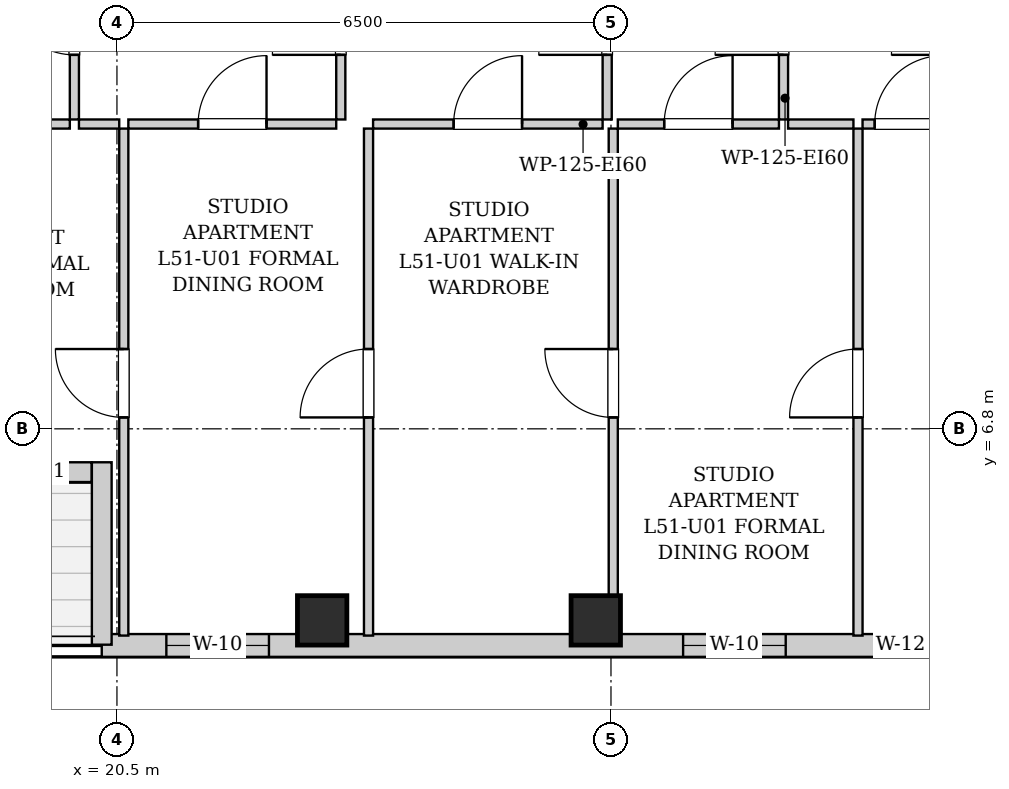
"""IFC4 building model, lengths in metres.
Left out: names, types, materials, properties, quantities, classifications, styles, units other than length and angle.
Written with IfcOpenShell. Run it as: python <this file> out.ifc"""

import sys

from ifc_helpers import new_model, si_unit, direction, frame, frame_2d, origin, origin_2d, place, context, subcontext, project, spatial, rectangle, extrude, element, fill, save


model = new_model("IFC4")
c1 = context("Model", 3, precision=1e-05, world=origin(), true_north=direction((0.0, 1.0)))
c2 = subcontext(c1, "Body", "Model", "MODEL_VIEW")
j1 = project(units=[si_unit("LENGTHUNIT", "METRE"), si_unit("PLANEANGLEUNIT", "RADIAN")], contexts=[c1])
p1 = place(None, origin())
s1 = spatial("IfcSite", under=j1, at=p1, CompositionType="ELEMENT")
p2 = place(p1, origin())
s2 = spatial("IfcBuilding", under=s1, at=p2, CompositionType="ELEMENT")
p3 = place(p2, frame((0.0, 0.0, 177.7)))
s3 = spatial("IfcBuildingStorey", under=s2, at=p3, CompositionType="ELEMENT", Elevation=177.7)
for number, where, z_axis, x_axis in (
    (1, (23.2, 4.28, 0.0), (0.0, 0.0, 1.0), (1.0, 0.0, 0.0)),
    (2, (26.8, 4.28, 0.0), (0.0, 0.0, 1.0), (1.0, 0.0, 0.0)),
):
    element("IfcColumn", number, at=place(p3, frame(where, z_axis=z_axis, x_axis=x_axis)), inside=s3, PredefinedType="COLUMN", context=c2, shape_type="SweptSolid", body=[
        extrude(rectangle(XDim=0.65, YDim=0.65, at=origin_2d()), origin(), (0.0, 0.0, 1.0), 3.3),
    ])
p4 = place(p3, frame((31.5, 3.95, 0.0), z_axis=(0.0, 0.0, 1.0), x_axis=(-1.0, 0.0, 0.0)))
e3 = element("IfcWall", 3, at=p4, inside=s3, PredefinedType="SOLIDWALL", context=c2, shape_type="SweptSolid", body=[
    extrude(rectangle(XDim=11.2, YDim=0.3, at=frame_2d((5.6, 0.0))), origin(), (0.0, 0.0, 1.0), 3.04),
])
p5 = place(p4, frame((9.0, 0.0, 0.55)))
e4 = element("IfcOpeningElement", 4, at=p5, cuts=e3, PredefinedType="OPENING", context=c2, shape_type="SweptSolid", body=[
    extrude(rectangle(XDim=1.35, YDim=1.2, at=frame_2d((0.675, 0.6))), frame((0.0, 0.16, 0.0), z_axis=(0.0, -1.0, 0.0), x_axis=(1.0, 0.0, 0.0)), (0.0, 0.0, 1.0), 0.32),
])
p6 = place(p4, frame((2.201, 0.0, 0.55)))
e5 = element("IfcOpeningElement", 5, at=p6, cuts=e3, PredefinedType="OPENING", context=c2, shape_type="SweptSolid", body=[
    extrude(rectangle(XDim=1.35, YDim=1.2, at=frame_2d((0.675, 0.6))), frame((0.0, 0.16, 0.0), z_axis=(0.0, -1.0, 0.0), x_axis=(1.0, 0.0, 0.0)), (0.0, 0.0, 1.0), 0.32),
])
p7 = place(p4, frame((0.35, 0.0, 0.55)))
e6 = element("IfcOpeningElement", 6, at=p7, cuts=e3, PredefinedType="OPENING", context=c2, shape_type="SweptSolid", body=[
    extrude(rectangle(XDim=0.68, YDim=1.2, at=frame_2d((0.34, 0.6))), frame((0.0, 0.16, 0.0), z_axis=(0.0, -1.0, 0.0), x_axis=(1.0, 0.0, 0.0)), (0.0, 0.0, 1.0), 0.32),
])
p8 = place(p3, frame((20.3, 3.96, 0.0), z_axis=(0.0, 0.0, 1.0), x_axis=(0.0, 1.0, 0.0)))
e7 = element("IfcWall", 7, at=p8, inside=s3, PredefinedType="SOLIDWALL", context=c2, shape_type="SweptSolid", body=[
    extrude(rectangle(XDim=2.4, YDim=0.26, at=frame_2d((1.2, 0.0))), origin(), (0.0, 0.0, 1.0), 3.04),
])
p9 = place(p3, frame((20.166, 6.23, 0.0), z_axis=(0.0, 0.0, 1.0), x_axis=(-1.0, 0.0, 0.0)))
e8 = element("IfcWall", 8, at=p9, inside=s3, PredefinedType="SOLIDWALL", context=c2, shape_type="SweptSolid", body=[
    extrude(rectangle(XDim=4.332, YDim=0.26, at=frame_2d((2.166, 0.0))), origin(), (0.0, 0.0, 1.0), 3.04),
])
p10 = place(p9, frame((1.556, 0.0, 0.0)))
e9 = element("IfcOpeningElement", 9, at=p10, cuts=e8, PredefinedType="OPENING", context=c2, shape_type="SweptSolid", body=[
    extrude(rectangle(XDim=1.1, YDim=2.0, at=frame_2d((0.55, 1.0))), frame((0.0, 0.14, 0.0), z_axis=(0.0, -1.0, 0.0), x_axis=(1.0, 0.0, 0.0)), (0.0, 0.0, 1.0), 0.28),
])
p11 = place(p9, frame((0.546, 0.0, 0.55)))
e10 = element("IfcOpeningElement", 10, at=p11, cuts=e8, PredefinedType="OPENING", context=c2, shape_type="SweptSolid", body=[
    extrude(rectangle(XDim=0.85, YDim=1.2, at=frame_2d((0.425, 0.6))), frame((0.0, 0.14, 0.0), z_axis=(0.0, -1.0, 0.0), x_axis=(1.0, 0.0, 0.0)), (0.0, 0.0, 1.0), 0.28),
])
p12 = place(p3, frame((19.94, 10.87, 0.0), z_axis=(0.0, 0.0, 1.0), x_axis=(0.0, 1.0, 0.0)))
e11 = element("IfcWall", 11, at=p12, inside=s3, PredefinedType="PARTITIONING", context=c2, shape_type="SweptSolid", body=[
    extrude(rectangle(XDim=2.6, YDim=0.12, at=frame_2d((1.3, 0.0))), origin(), (0.0, 0.0, 1.0), 3.04),
])
p13 = place(p12, frame((0.85, 0.0, 0.0)))
e12 = element("IfcOpeningElement", 12, at=p13, cuts=e11, PredefinedType="OPENING", context=c2, shape_type="SweptSolid", body=[
    extrude(rectangle(XDim=0.9, YDim=2.05, at=frame_2d((0.45, 1.025))), frame((0.0, 0.07, 0.0), z_axis=(0.0, -1.0, 0.0), x_axis=(1.0, 0.0, 0.0)), (0.0, 0.0, 1.0), 0.14),
])
p14 = place(p3, frame((17.43, 10.81, 0.0), z_axis=(0.0, 0.0, 1.0), x_axis=(1.0, 0.0, 0.0)))
e13 = element("IfcWall", 13, at=p14, inside=s3, PredefinedType="PARTITIONING", context=c2, shape_type="SweptSolid", body=[
    extrude(rectangle(XDim=2.45, YDim=0.12, at=frame_2d((1.225, 0.0))), origin(), (0.0, 0.0, 1.0), 3.04),
])
p15 = place(p14, frame((0.775, 0.0, 0.0)))
e14 = element("IfcOpeningElement", 14, at=p15, cuts=e13, PredefinedType="OPENING", context=c2, shape_type="SweptSolid", body=[
    extrude(rectangle(XDim=0.9, YDim=2.05, at=frame_2d((0.45, 1.025))), frame((0.0, 0.07, 0.0), z_axis=(0.0, -1.0, 0.0), x_axis=(1.0, 0.0, 0.0)), (0.0, 0.0, 1.0), 0.14),
])
p16 = place(p3, frame((23.445, 10.87, 0.0), z_axis=(0.0, 0.0, 1.0), x_axis=(0.0, 1.0, 0.0)))
e15 = element("IfcWall", 15, at=p16, inside=s3, PredefinedType="PARTITIONING", context=c2, shape_type="SweptSolid", body=[
    extrude(rectangle(XDim=2.6, YDim=0.12, at=frame_2d((1.3, 0.0))), origin(), (0.0, 0.0, 1.0), 3.04),
])
p17 = place(p16, frame((0.85, 0.0, 0.0)))
e16 = element("IfcOpeningElement", 16, at=p17, cuts=e15, PredefinedType="OPENING", context=c2, shape_type="SweptSolid", body=[
    extrude(rectangle(XDim=0.9, YDim=2.05, at=frame_2d((0.45, 1.025))), frame((0.0, 0.07, 0.0), z_axis=(0.0, -1.0, 0.0), x_axis=(1.0, 0.0, 0.0)), (0.0, 0.0, 1.0), 0.14),
])
p18 = place(p3, frame((20.0, 10.81, 0.0), z_axis=(0.0, 0.0, 1.0), x_axis=(1.0, 0.0, 0.0)))
e17 = element("IfcWall", 17, at=p18, inside=s3, PredefinedType="PARTITIONING", context=c2, shape_type="SweptSolid", body=[
    extrude(rectangle(XDim=0.53, YDim=0.12, at=frame_2d((0.265, 0.0))), origin(), (0.0, 0.0, 1.0), 3.04),
])
p19 = place(p3, frame((20.65, 10.81, 0.0), z_axis=(0.0, 0.0, 1.0), x_axis=(1.0, 0.0, 0.0)))
e18 = element("IfcWall", 18, at=p19, inside=s3, PredefinedType="PARTITIONING", context=c2, shape_type="SweptSolid", body=[
    extrude(rectangle(XDim=2.735, YDim=0.12, at=frame_2d((1.368, 0.0))), origin(), (0.0, 0.0, 1.0), 3.04),
])
p20 = place(p19, frame((0.918, 0.0, 0.0)))
e19 = element("IfcOpeningElement", 19, at=p20, cuts=e18, PredefinedType="OPENING", context=c2, shape_type="SweptSolid", body=[
    extrude(rectangle(XDim=0.9, YDim=2.05, at=frame_2d((0.45, 1.025))), frame((0.0, 0.07, 0.0), z_axis=(0.0, -1.0, 0.0), x_axis=(1.0, 0.0, 0.0)), (0.0, 0.0, 1.0), 0.14),
])
p21 = place(p3, frame((26.95, 10.87, 0.0), z_axis=(0.0, 0.0, 1.0), x_axis=(0.0, 1.0, 0.0)))
e20 = element("IfcWall", 20, at=p21, inside=s3, PredefinedType="PARTITIONING", context=c2, shape_type="SweptSolid", body=[
    extrude(rectangle(XDim=2.6, YDim=0.12, at=frame_2d((1.3, 0.0))), origin(), (0.0, 0.0, 1.0), 3.04),
])
p22 = place(p21, frame((0.85, 0.0, 0.0)))
e21 = element("IfcOpeningElement", 21, at=p22, cuts=e20, PredefinedType="OPENING", context=c2, shape_type="SweptSolid", body=[
    extrude(rectangle(XDim=0.9, YDim=2.05, at=frame_2d((0.45, 1.025))), frame((0.0, 0.07, 0.0), z_axis=(0.0, -1.0, 0.0), x_axis=(1.0, 0.0, 0.0)), (0.0, 0.0, 1.0), 0.14),
])
p23 = place(p3, frame((23.87, 10.81, 0.0), z_axis=(0.0, 0.0, 1.0), x_axis=(1.0, 0.0, 0.0)))
e22 = element("IfcWall", 22, at=p23, inside=s3, PredefinedType="PARTITIONING", context=c2, shape_type="SweptSolid", body=[
    extrude(rectangle(XDim=3.02, YDim=0.12, at=frame_2d((1.51, 0.0))), origin(), (0.0, 0.0, 1.0), 3.04),
])
p24 = place(p23, frame((1.06, 0.0, 0.0)))
e23 = element("IfcOpeningElement", 23, at=p24, cuts=e22, PredefinedType="OPENING", context=c2, shape_type="SweptSolid", body=[
    extrude(rectangle(XDim=0.9, YDim=2.05, at=frame_2d((0.45, 1.025))), frame((0.0, 0.07, 0.0), z_axis=(0.0, -1.0, 0.0), x_axis=(1.0, 0.0, 0.0)), (0.0, 0.0, 1.0), 0.14),
])
p25 = place(p3, frame((29.27, 10.87, 0.0), z_axis=(0.0, 0.0, 1.0), x_axis=(0.0, 1.0, 0.0)))
e24 = element("IfcWall", 24, at=p25, inside=s3, PredefinedType="PARTITIONING", context=c2, shape_type="SweptSolid", body=[
    extrude(rectangle(XDim=2.6, YDim=0.12, at=frame_2d((1.3, 0.0))), origin(), (0.0, 0.0, 1.0), 3.04),
])
p26 = place(p25, frame((0.85, 0.0, 0.0)))
e25 = element("IfcOpeningElement", 25, at=p26, cuts=e24, PredefinedType="OPENING", context=c2, shape_type="SweptSolid", body=[
    extrude(rectangle(XDim=0.9, YDim=2.05, at=frame_2d((0.45, 1.025))), frame((0.0, 0.07, 0.0), z_axis=(0.0, -1.0, 0.0), x_axis=(1.0, 0.0, 0.0)), (0.0, 0.0, 1.0), 0.14),
])
p27 = place(p3, frame((27.09, 10.81, 0.0), z_axis=(0.0, 0.0, 1.0), x_axis=(1.0, 0.0, 0.0)))
e26 = element("IfcWall", 26, at=p27, inside=s3, PredefinedType="PARTITIONING", context=c2, shape_type="SweptSolid", body=[
    extrude(rectangle(XDim=2.12, YDim=0.12, at=frame_2d((1.06, 0.0))), origin(), (0.0, 0.0, 1.0), 3.04),
])
p28 = place(p27, frame((0.61, 0.0, 0.0)))
e27 = element("IfcOpeningElement", 27, at=p28, cuts=e26, PredefinedType="OPENING", context=c2, shape_type="SweptSolid", body=[
    extrude(rectangle(XDim=0.9, YDim=2.05, at=frame_2d((0.45, 1.025))), frame((0.0, 0.07, 0.0), z_axis=(0.0, -1.0, 0.0), x_axis=(1.0, 0.0, 0.0)), (0.0, 0.0, 1.0), 0.14),
])
p29 = place(p3, frame((29.33, 10.81, 0.0), z_axis=(0.0, 0.0, 1.0), x_axis=(1.0, 0.0, 0.0)))
e28 = element("IfcWall", 28, at=p29, inside=s3, PredefinedType="PARTITIONING", context=c2, shape_type="SweptSolid", body=[
    extrude(rectangle(XDim=0.86, YDim=0.12, at=frame_2d((0.43, 0.0))), origin(), (0.0, 0.0, 1.0), 3.04),
])
p30 = place(p3, frame((30.31, 10.81, 0.0), z_axis=(0.0, 0.0, 1.0), x_axis=(1.0, 0.0, 0.0)))
e29 = element("IfcWall", 29, at=p30, inside=s3, PredefinedType="PARTITIONING", context=c2, shape_type="SweptSolid", body=[
    extrude(rectangle(XDim=1.22, YDim=0.12, at=frame_2d((0.61, 0.0))), origin(), (0.0, 0.0, 1.0), 3.04),
])
p31 = place(p30, frame((0.16, 0.0, 0.0)))
e30 = element("IfcOpeningElement", 30, at=p31, cuts=e29, PredefinedType="OPENING", context=c2, shape_type="SweptSolid", body=[
    extrude(rectangle(XDim=0.9, YDim=2.05, at=frame_2d((0.45, 1.025))), frame((0.0, 0.07, 0.0), z_axis=(0.0, -1.0, 0.0), x_axis=(1.0, 0.0, 0.0)), (0.0, 0.0, 1.0), 0.14),
])
p32 = place(p3, frame((20.59, 4.08, 0.0), z_axis=(0.0, 0.0, 1.0), x_axis=(0.0, 1.0, 0.0)))
e31 = element("IfcWall", 31, at=p32, inside=s3, PredefinedType="PARTITIONING", context=c2, shape_type="SweptSolid", body=[
    extrude(rectangle(XDim=6.67, YDim=0.12, at=frame_2d((3.335, 0.0))), origin(), (0.0, 0.0, 1.0), 3.04),
])
p33 = place(p32, frame((2.87, 0.0, 0.0)))
e32 = element("IfcOpeningElement", 32, at=p33, cuts=e31, PredefinedType="OPENING", context=c2, shape_type="SweptSolid", body=[
    extrude(rectangle(XDim=0.9, YDim=2.05, at=frame_2d((0.45, 1.025))), frame((0.0, 0.07, 0.0), z_axis=(0.0, -1.0, 0.0), x_axis=(1.0, 0.0, 0.0)), (0.0, 0.0, 1.0), 0.14),
])
p34 = place(p3, frame((23.81, 4.08, 0.0), z_axis=(0.0, 0.0, 1.0), x_axis=(0.0, 1.0, 0.0)))
e33 = element("IfcWall", 33, at=p34, inside=s3, PredefinedType="PARTITIONING", context=c2, shape_type="SweptSolid", body=[
    extrude(rectangle(XDim=6.67, YDim=0.12, at=frame_2d((3.335, 0.0))), origin(), (0.0, 0.0, 1.0), 3.04),
])
p35 = place(p34, frame((2.87, 0.0, 0.0)))
e34 = element("IfcOpeningElement", 34, at=p35, cuts=e33, PredefinedType="OPENING", context=c2, shape_type="SweptSolid", body=[
    extrude(rectangle(XDim=0.9, YDim=2.05, at=frame_2d((0.45, 1.025))), frame((0.0, 0.07, 0.0), z_axis=(0.0, -1.0, 0.0), x_axis=(1.0, 0.0, 0.0)), (0.0, 0.0, 1.0), 0.14),
])
p36 = place(p3, frame((27.03, 4.08, 0.0), z_axis=(0.0, 0.0, 1.0), x_axis=(0.0, 1.0, 0.0)))
e35 = element("IfcWall", 35, at=p36, inside=s3, PredefinedType="PARTITIONING", context=c2, shape_type="SweptSolid", body=[
    extrude(rectangle(XDim=6.67, YDim=0.12, at=frame_2d((3.335, 0.0))), origin(), (0.0, 0.0, 1.0), 3.04),
])
p37 = place(p36, frame((2.87, 0.0, 0.0)))
e36 = element("IfcOpeningElement", 36, at=p37, cuts=e35, PredefinedType="OPENING", context=c2, shape_type="SweptSolid", body=[
    extrude(rectangle(XDim=0.9, YDim=2.05, at=frame_2d((0.45, 1.025))), frame((0.0, 0.07, 0.0), z_axis=(0.0, -1.0, 0.0), x_axis=(1.0, 0.0, 0.0)), (0.0, 0.0, 1.0), 0.14),
])
p38 = place(p3, frame((30.25, 4.08, 0.0), z_axis=(0.0, 0.0, 1.0), x_axis=(0.0, 1.0, 0.0)))
e37 = element("IfcWall", 37, at=p38, inside=s3, PredefinedType="PARTITIONING", context=c2, shape_type="SweptSolid", body=[
    extrude(rectangle(XDim=6.67, YDim=0.12, at=frame_2d((3.335, 0.0))), origin(), (0.0, 0.0, 1.0), 3.04),
])
p39 = place(p38, frame((2.87, 0.0, 0.0)))
e38 = element("IfcOpeningElement", 38, at=p39, cuts=e37, PredefinedType="OPENING", context=c2, shape_type="SweptSolid", body=[
    extrude(rectangle(XDim=0.9, YDim=2.05, at=frame_2d((0.45, 1.025))), frame((0.0, 0.07, 0.0), z_axis=(0.0, -1.0, 0.0), x_axis=(1.0, 0.0, 0.0)), (0.0, 0.0, 1.0), 0.14),
])
p40 = place(p13, origin())
e39 = element("IfcDoor", 39, at=p40, inside=s3, OperationType="SINGLE_SWING_RIGHT", PredefinedType="DOOR", context=c2, shape_type="SweptSolid", body=[
    extrude(rectangle(XDim=0.9, YDim=2.05, at=frame_2d((0.45, 1.025))), frame((0.0, 0.025, 0.0), z_axis=(0.0, -1.0, 0.0), x_axis=(1.0, 0.0, 0.0)), (0.0, 0.0, 1.0), 0.05),
])
fill(e12, e39)
p41 = place(p17, origin())
e40 = element("IfcDoor", 40, at=p41, inside=s3, OperationType="SINGLE_SWING_LEFT", PredefinedType="DOOR", context=c2, shape_type="SweptSolid", body=[
    extrude(rectangle(XDim=0.9, YDim=2.05, at=frame_2d((0.45, 1.025))), frame((0.0, 0.025, 0.0), z_axis=(0.0, -1.0, 0.0), x_axis=(1.0, 0.0, 0.0)), (0.0, 0.0, 1.0), 0.05),
])
fill(e16, e40)
p42 = place(p20, origin())
e41 = element("IfcDoor", 41, at=p42, inside=s3, OperationType="SINGLE_SWING_RIGHT", PredefinedType="DOOR", context=c2, shape_type="SweptSolid", body=[
    extrude(rectangle(XDim=0.9, YDim=2.05, at=frame_2d((0.45, 1.025))), frame((0.0, 0.025, 0.0), z_axis=(0.0, -1.0, 0.0), x_axis=(1.0, 0.0, 0.0)), (0.0, 0.0, 1.0), 0.05),
])
fill(e19, e41)
p43 = place(p22, origin())
e42 = element("IfcDoor", 42, at=p43, inside=s3, OperationType="SINGLE_SWING_LEFT", PredefinedType="DOOR", context=c2, shape_type="SweptSolid", body=[
    extrude(rectangle(XDim=0.9, YDim=2.05, at=frame_2d((0.45, 1.025))), frame((0.0, 0.025, 0.0), z_axis=(0.0, -1.0, 0.0), x_axis=(1.0, 0.0, 0.0)), (0.0, 0.0, 1.0), 0.05),
])
fill(e21, e42)
p44 = place(p24, origin())
e43 = element("IfcDoor", 43, at=p44, inside=s3, OperationType="SINGLE_SWING_RIGHT", PredefinedType="DOOR", context=c2, shape_type="SweptSolid", body=[
    extrude(rectangle(XDim=0.9, YDim=2.05, at=frame_2d((0.45, 1.025))), frame((0.0, 0.025, 0.0), z_axis=(0.0, -1.0, 0.0), x_axis=(1.0, 0.0, 0.0)), (0.0, 0.0, 1.0), 0.05),
])
fill(e23, e43)
p45 = place(p26, origin())
e44 = element("IfcDoor", 44, at=p45, inside=s3, OperationType="SINGLE_SWING_LEFT", PredefinedType="DOOR", context=c2, shape_type="SweptSolid", body=[
    extrude(rectangle(XDim=0.9, YDim=2.05, at=frame_2d((0.45, 1.025))), frame((0.0, 0.025, 0.0), z_axis=(0.0, -1.0, 0.0), x_axis=(1.0, 0.0, 0.0)), (0.0, 0.0, 1.0), 0.05),
])
fill(e25, e44)
p46 = place(p28, origin())
e45 = element("IfcDoor", 45, at=p46, inside=s3, OperationType="SINGLE_SWING_RIGHT", PredefinedType="DOOR", context=c2, shape_type="SweptSolid", body=[
    extrude(rectangle(XDim=0.9, YDim=2.05, at=frame_2d((0.45, 1.025))), frame((0.0, 0.025, 0.0), z_axis=(0.0, -1.0, 0.0), x_axis=(1.0, 0.0, 0.0)), (0.0, 0.0, 1.0), 0.05),
])
fill(e27, e45)
p47 = place(p31, origin())
e46 = element("IfcDoor", 46, at=p47, inside=s3, OperationType="SINGLE_SWING_RIGHT", PredefinedType="DOOR", context=c2, shape_type="SweptSolid", body=[
    extrude(rectangle(XDim=0.9, YDim=2.05, at=frame_2d((0.45, 1.025))), frame((0.0, 0.025, 0.0), z_axis=(0.0, -1.0, 0.0), x_axis=(1.0, 0.0, 0.0)), (0.0, 0.0, 1.0), 0.05),
])
fill(e30, e46)
p48 = place(p33, origin())
e47 = element("IfcDoor", 47, at=p48, inside=s3, OperationType="SINGLE_SWING_RIGHT", PredefinedType="DOOR", context=c2, shape_type="SweptSolid", body=[
    extrude(rectangle(XDim=0.9, YDim=2.05, at=frame_2d((0.45, 1.025))), frame((0.0, 0.025, 0.0), z_axis=(0.0, -1.0, 0.0), x_axis=(1.0, 0.0, 0.0)), (0.0, 0.0, 1.0), 0.05),
])
fill(e32, e47)
p49 = place(p35, origin())
e48 = element("IfcDoor", 48, at=p49, inside=s3, OperationType="SINGLE_SWING_LEFT", PredefinedType="DOOR", context=c2, shape_type="SweptSolid", body=[
    extrude(rectangle(XDim=0.9, YDim=2.05, at=frame_2d((0.45, 1.025))), frame((0.0, 0.025, 0.0), z_axis=(0.0, -1.0, 0.0), x_axis=(1.0, 0.0, 0.0)), (0.0, 0.0, 1.0), 0.05),
])
fill(e34, e48)
p50 = place(p37, origin())
e49 = element("IfcDoor", 49, at=p50, inside=s3, OperationType="SINGLE_SWING_RIGHT", PredefinedType="DOOR", context=c2, shape_type="SweptSolid", body=[
    extrude(rectangle(XDim=0.9, YDim=2.05, at=frame_2d((0.45, 1.025))), frame((0.0, 0.025, 0.0), z_axis=(0.0, -1.0, 0.0), x_axis=(1.0, 0.0, 0.0)), (0.0, 0.0, 1.0), 0.05),
])
fill(e36, e49)
p51 = place(p39, origin())
e50 = element("IfcDoor", 50, at=p51, inside=s3, OperationType="SINGLE_SWING_LEFT", PredefinedType="DOOR", context=c2, shape_type="SweptSolid", body=[
    extrude(rectangle(XDim=0.9, YDim=2.05, at=frame_2d((0.45, 1.025))), frame((0.0, 0.025, 0.0), z_axis=(0.0, -1.0, 0.0), x_axis=(1.0, 0.0, 0.0)), (0.0, 0.0, 1.0), 0.05),
])
fill(e38, e50)
p52 = place(p5, origin())
e51 = element("IfcWindow", 51, at=p52, inside=s3, PartitioningType="SINGLE_PANEL", PredefinedType="WINDOW", context=c2, shape_type="SweptSolid", body=[
    extrude(rectangle(XDim=1.35, YDim=1.2, at=frame_2d((0.675, 0.6))), frame((0.0, 0.03, 0.0), z_axis=(0.0, -1.0, 0.0), x_axis=(1.0, 0.0, 0.0)), (0.0, 0.0, 1.0), 0.06),
])
fill(e4, e51)
p53 = place(p6, origin())
e52 = element("IfcWindow", 52, at=p53, inside=s3, PartitioningType="SINGLE_PANEL", PredefinedType="WINDOW", context=c2, shape_type="SweptSolid", body=[
    extrude(rectangle(XDim=1.35, YDim=1.2, at=frame_2d((0.675, 0.6))), frame((0.0, 0.03, 0.0), z_axis=(0.0, -1.0, 0.0), x_axis=(1.0, 0.0, 0.0)), (0.0, 0.0, 1.0), 0.06),
])
fill(e5, e52)
p54 = place(p7, origin())
e53 = element("IfcWindow", 53, at=p54, inside=s3, PartitioningType="SINGLE_PANEL", PredefinedType="WINDOW", context=c2, shape_type="SweptSolid", body=[
    extrude(rectangle(XDim=0.68, YDim=1.2, at=frame_2d((0.34, 0.6))), frame((0.0, 0.03, 0.0), z_axis=(0.0, -1.0, 0.0), x_axis=(1.0, 0.0, 0.0)), (0.0, 0.0, 1.0), 0.06),
])
fill(e6, e53)
save(model, sys.argv[1])
